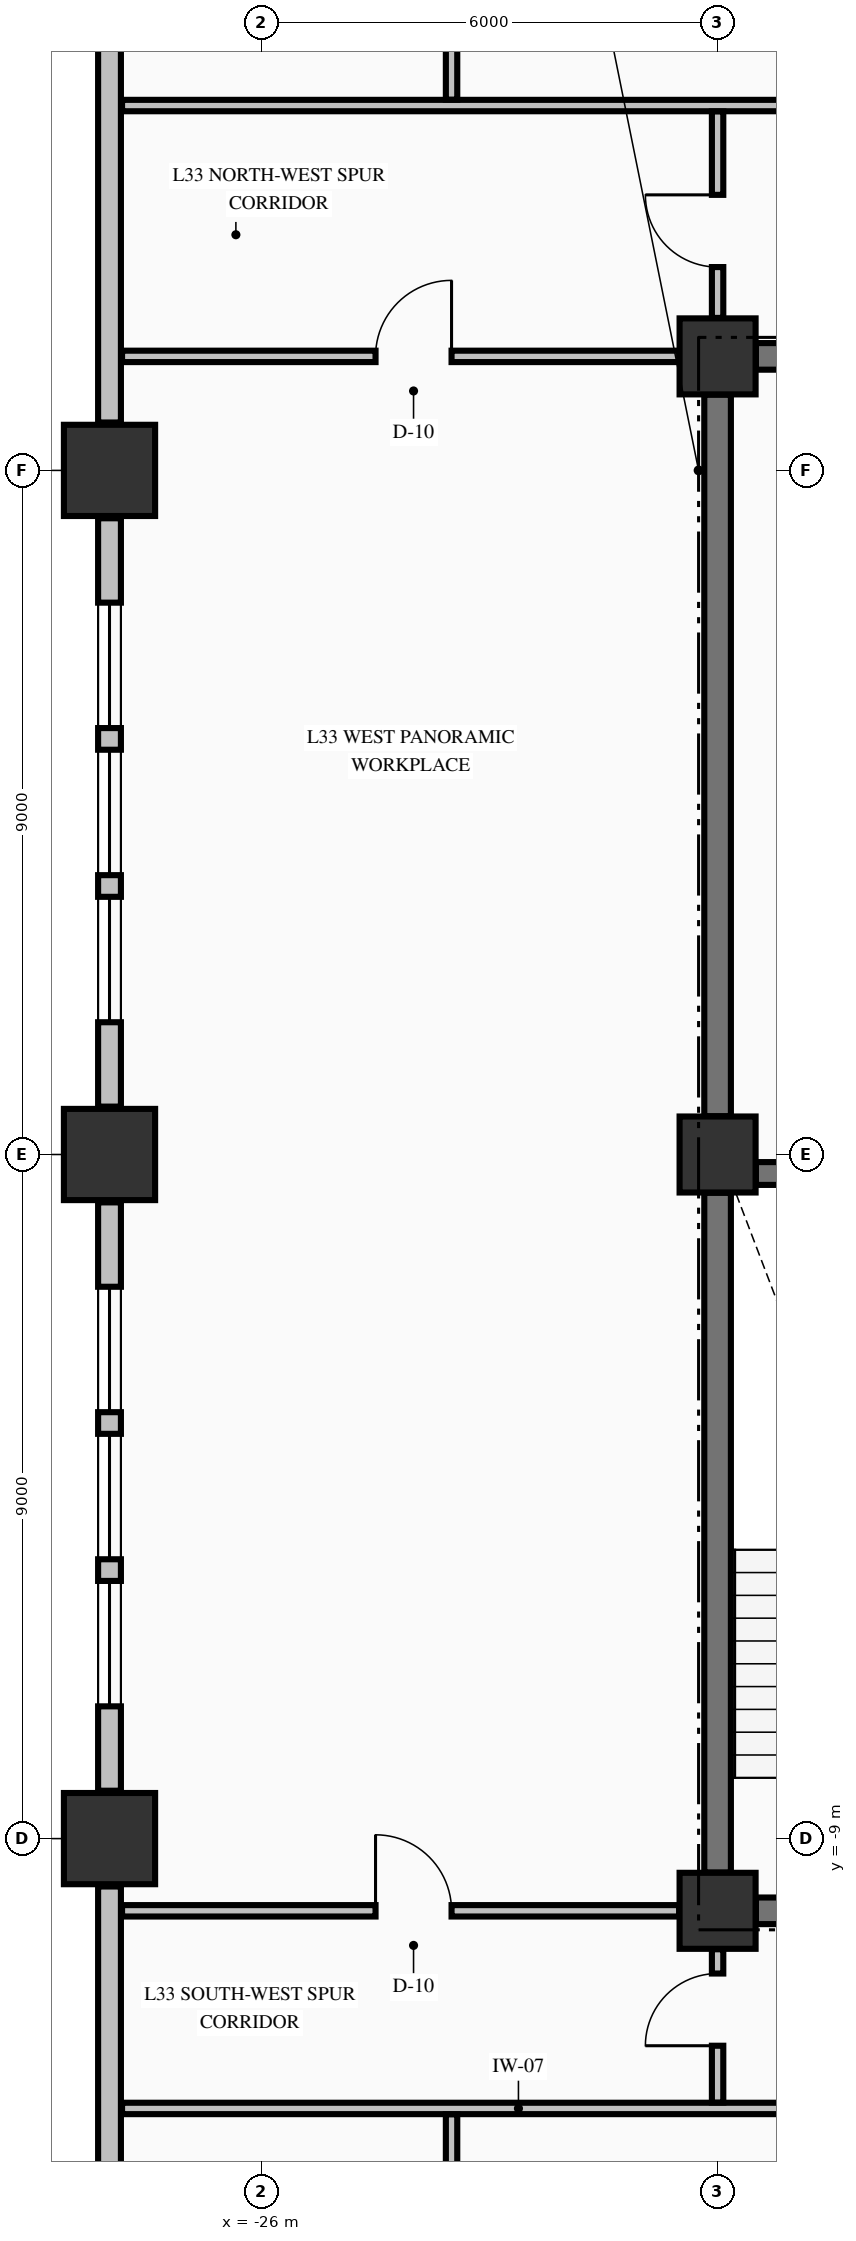
"""IFC4 building model, lengths in metres.
Left out: names, types, materials, properties, quantities, classifications, styles, units other than length and angle.
Written with IfcOpenShell. Run it as: python <this file> out.ifc"""

import sys

from ifc_helpers import new_model, si_unit, direction, frame, frame_2d, origin, origin_2d, place, context, subcontext, project, spatial, rectangle, extrude, element, fill, save


model = new_model("IFC4")
c1 = context("Model", 3, precision=1e-05, world=origin(), true_north=direction((0.0, 1.0)))
c2 = subcontext(c1, "Body", "Model", "MODEL_VIEW")
j1 = project(units=[si_unit("LENGTHUNIT", "METRE"), si_unit("PLANEANGLEUNIT", "RADIAN")], contexts=[c1])
p1 = place(None, origin())
s1 = spatial("IfcSite", under=j1, at=p1, CompositionType="ELEMENT")
p2 = place(p1, origin())
s2 = spatial("IfcBuilding", under=s1, at=p2, CompositionType="ELEMENT")
p3 = place(p2, frame((0.0, 0.0, 132.06)))
s3 = spatial("IfcBuildingStorey", under=s2, at=p3, CompositionType="ELEMENT", Elevation=132.06)
for number, where, z_axis, x_axis in (
    (1, (-28.0, -9.0, -0.25), (0.0, 0.0, 1.0), (1.0, 0.0, 0.0)),
    (2, (-28.0, 0.0, -0.25), (0.0, 0.0, 1.0), (1.0, 0.0, 0.0)),
    (3, (-28.0, 9.0, -0.25), (0.0, 0.0, 1.0), (1.0, 0.0, 0.0)),
):
    element("IfcColumn", number, at=place(p3, frame(where, z_axis=z_axis, x_axis=x_axis)), inside=s3, PredefinedType="COLUMN", context=c2, shape_type="SweptSolid", body=[
        extrude(rectangle(XDim=1.2, YDim=1.2, at=origin_2d()), origin(), (0.0, 0.0, 1.0), 3.57),
    ])
for number, where, z_axis, x_axis in (
    (4, (-20.0, -9.95, -0.25), (0.0, 0.0, 1.0), (1.0, 0.0, 0.0)),
    (5, (-20.0, 10.5, -0.25), (0.0, 0.0, 1.0), (1.0, 0.0, 0.0)),
    (6, (-20.0, 0.0, -0.25), (0.0, 0.0, 1.0), (1.0, 0.0, 0.0)),
):
    element("IfcColumn", number, at=place(p3, frame(where, z_axis=z_axis, x_axis=x_axis)), inside=s3, PredefinedType="COLUMN", context=c2, shape_type="SweptSolid", body=[
        extrude(rectangle(XDim=1.0, YDim=1.0, at=origin_2d()), origin(), (0.0, 0.0, 1.0), 3.57),
    ])
p4 = place(p3, frame((-28.0, -9.63, 0.0), z_axis=(0.0, 0.0, 1.0), x_axis=(0.0, -1.0, 0.0)))
e7 = element("IfcWall", 7, at=p4, inside=s3, PredefinedType="STANDARD", context=c2, shape_type="SweptSolid", body=[
    extrude(rectangle(XDim=10.74, YDim=0.3, at=frame_2d((5.37, 0.0))), origin(), (0.0, 0.0, 1.0), 2.712),
])
p5 = place(p3, frame((-28.0, -0.63, 0.0), z_axis=(0.0, 0.0, 1.0), x_axis=(0.0, -1.0, 0.0)))
e8 = element("IfcWall", 8, at=p5, inside=s3, PredefinedType="STANDARD", context=c2, shape_type="SweptSolid", body=[
    extrude(rectangle(XDim=7.74, YDim=0.3, at=frame_2d((3.87, 0.0))), origin(), (0.0, 0.0, 1.0), 2.712),
])
p6 = place(p5, frame((1.11, 0.0, 0.8)))
e9 = element("IfcOpeningElement", 9, at=p6, cuts=e8, PredefinedType="OPENING", context=c2, shape_type="SweptSolid", body=[
    extrude(rectangle(XDim=1.65, YDim=1.7, at=frame_2d((0.825, 0.85))), frame((0.0, 0.16, 0.0), z_axis=(0.0, -1.0, 0.0), x_axis=(1.0, 0.0, 0.0)), (0.0, 0.0, 1.0), 0.32),
])
p7 = place(p5, frame((3.045, 0.0, 0.8)))
e10 = element("IfcOpeningElement", 10, at=p7, cuts=e8, PredefinedType="OPENING", context=c2, shape_type="SweptSolid", body=[
    extrude(rectangle(XDim=1.65, YDim=1.7, at=frame_2d((0.825, 0.85))), frame((0.0, 0.16, 0.0), z_axis=(0.0, -1.0, 0.0), x_axis=(1.0, 0.0, 0.0)), (0.0, 0.0, 1.0), 0.32),
])
p8 = place(p5, frame((4.98, 0.0, 0.8)))
e11 = element("IfcOpeningElement", 11, at=p8, cuts=e8, PredefinedType="OPENING", context=c2, shape_type="SweptSolid", body=[
    extrude(rectangle(XDim=1.65, YDim=1.7, at=frame_2d((0.825, 0.85))), frame((0.0, 0.16, 0.0), z_axis=(0.0, -1.0, 0.0), x_axis=(1.0, 0.0, 0.0)), (0.0, 0.0, 1.0), 0.32),
])
p9 = place(p3, frame((-28.0, 8.37, 0.0), z_axis=(0.0, 0.0, 1.0), x_axis=(0.0, -1.0, 0.0)))
e12 = element("IfcWall", 12, at=p9, inside=s3, PredefinedType="STANDARD", context=c2, shape_type="SweptSolid", body=[
    extrude(rectangle(XDim=7.74, YDim=0.3, at=frame_2d((3.87, 0.0))), origin(), (0.0, 0.0, 1.0), 2.712),
])
p10 = place(p9, frame((1.11, 0.0, 0.8)))
e13 = element("IfcOpeningElement", 13, at=p10, cuts=e12, PredefinedType="OPENING", context=c2, shape_type="SweptSolid", body=[
    extrude(rectangle(XDim=1.65, YDim=1.7, at=frame_2d((0.825, 0.85))), frame((0.0, 0.16, 0.0), z_axis=(0.0, -1.0, 0.0), x_axis=(1.0, 0.0, 0.0)), (0.0, 0.0, 1.0), 0.32),
])
p11 = place(p9, frame((3.045, 0.0, 0.8)))
e14 = element("IfcOpeningElement", 14, at=p11, cuts=e12, PredefinedType="OPENING", context=c2, shape_type="SweptSolid", body=[
    extrude(rectangle(XDim=1.65, YDim=1.7, at=frame_2d((0.825, 0.85))), frame((0.0, 0.16, 0.0), z_axis=(0.0, -1.0, 0.0), x_axis=(1.0, 0.0, 0.0)), (0.0, 0.0, 1.0), 0.32),
])
p12 = place(p9, frame((4.98, 0.0, 0.8)))
e15 = element("IfcOpeningElement", 15, at=p12, cuts=e12, PredefinedType="OPENING", context=c2, shape_type="SweptSolid", body=[
    extrude(rectangle(XDim=1.65, YDim=1.7, at=frame_2d((0.825, 0.85))), frame((0.0, 0.16, 0.0), z_axis=(0.0, -1.0, 0.0), x_axis=(1.0, 0.0, 0.0)), (0.0, 0.0, 1.0), 0.32),
])
p13 = place(p3, frame((-28.0, 20.37, 0.0), z_axis=(0.0, 0.0, 1.0), x_axis=(0.0, -1.0, 0.0)))
e16 = element("IfcWall", 16, at=p13, inside=s3, PredefinedType="STANDARD", context=c2, shape_type="SweptSolid", body=[
    extrude(rectangle(XDim=10.74, YDim=0.3, at=frame_2d((5.37, 0.0))), origin(), (0.0, 0.0, 1.0), 2.712),
])
p14 = place(p3, frame((-19.496, -9.95, 0.0), z_axis=(0.0, 0.0, 1.0), x_axis=(1.0, 0.0, 0.0)))
e17 = element("IfcWall", 17, at=p14, inside=s3, PredefinedType="SHEAR", context=c2, shape_type="SweptSolid", body=[
    extrude(rectangle(XDim=4.796, YDim=0.35, at=frame_2d((2.398, 0.0))), origin(), (0.0, 0.0, 1.0), 3.32),
])
p15 = place(p14, frame((0.671, 0.0, 0.0)))
e18 = element("IfcOpeningElement", 18, at=p15, cuts=e17, PredefinedType="OPENING", context=c2, shape_type="SweptSolid", body=[
    extrude(rectangle(XDim=1.05, YDim=2.15, at=frame_2d((0.525, 1.075))), frame((0.0, 0.185, 0.0), z_axis=(0.0, -1.0, 0.0), x_axis=(1.0, 0.0, 0.0)), (0.0, 0.0, 1.0), 0.37),
])
p16 = place(p3, frame((-19.496, -0.25, 0.0), z_axis=(0.0, 0.0, 1.0), x_axis=(1.0, 0.0, 0.0)))
e19 = element("IfcWall", 19, at=p16, inside=s3, PredefinedType="SHEAR", context=c2, shape_type="SweptSolid", body=[
    extrude(rectangle(XDim=7.992, YDim=0.3, at=frame_2d((3.996, 0.0))), origin(), (0.0, 0.0, 1.0), 3.32),
])
p17 = place(p16, frame((5.796, 0.0, 0.0)))
e20 = element("IfcOpeningElement", 20, at=p17, cuts=e19, PredefinedType="OPENING", context=c2, shape_type="SweptSolid", body=[
    extrude(rectangle(XDim=1.1, YDim=2.15, at=frame_2d((0.55, 1.075))), frame((0.0, 0.16, 0.0), z_axis=(0.0, -1.0, 0.0), x_axis=(1.0, 0.0, 0.0)), (0.0, 0.0, 1.0), 0.32),
])
p18 = place(p3, frame((-19.496, 10.5, 0.0), z_axis=(0.0, 0.0, 1.0), x_axis=(1.0, 0.0, 0.0)))
e21 = element("IfcWall", 21, at=p18, inside=s3, PredefinedType="SHEAR", context=c2, shape_type="SweptSolid", body=[
    extrude(rectangle(XDim=4.796, YDim=0.35, at=frame_2d((2.398, 0.0))), origin(), (0.0, 0.0, 1.0), 3.32),
])
p19 = place(p18, frame((0.646, 0.0, 0.0)))
e22 = element("IfcOpeningElement", 22, at=p19, cuts=e21, PredefinedType="OPENING", context=c2, shape_type="SweptSolid", body=[
    extrude(rectangle(XDim=0.9, YDim=2.15, at=frame_2d((0.45, 1.075))), frame((0.0, 0.185, 0.0), z_axis=(0.0, -1.0, 0.0), x_axis=(1.0, 0.0, 0.0)), (0.0, 0.0, 1.0), 0.37),
])
p20 = place(p18, frame((3.271, 0.0, 0.0)))
e23 = element("IfcOpeningElement", 23, at=p20, cuts=e21, PredefinedType="OPENING", context=c2, shape_type="SweptSolid", body=[
    extrude(rectangle(XDim=0.95, YDim=2.15, at=frame_2d((0.475, 1.075))), frame((0.0, 0.185, 0.0), z_axis=(0.0, -1.0, 0.0), x_axis=(1.0, 0.0, 0.0)), (0.0, 0.0, 1.0), 0.37),
])
p21 = place(p3, frame((-27.835, -12.55, 0.0), z_axis=(0.0, 0.0, 1.0), x_axis=(1.0, 0.0, 0.0)))
e24 = element("IfcWall", 24, at=p21, inside=s3, PredefinedType="PARTITIONING", context=c2, shape_type="SweptSolid", body=[
    extrude(rectangle(XDim=50.67, YDim=0.15, at=frame_2d((25.335, 0.0))), origin(), (0.0, 0.0, 1.0), 3.32),
])
p22 = place(p21, frame((10.43, 0.0, 0.0)))
e25 = element("IfcOpeningElement", 25, at=p22, cuts=e24, PredefinedType="OPENING", context=c2, shape_type="SweptSolid", body=[
    extrude(rectangle(XDim=1.05, YDim=2.15, at=frame_2d((0.525, 1.075))), frame((0.0, 0.085, 0.0), z_axis=(0.0, -1.0, 0.0), x_axis=(1.0, 0.0, 0.0)), (0.0, 0.0, 1.0), 0.17),
])
p23 = place(p21, frame((15.06, 0.0, 0.0)))
e26 = element("IfcOpeningElement", 26, at=p23, cuts=e24, PredefinedType="OPENING", context=c2, shape_type="SweptSolid", body=[
    extrude(rectangle(XDim=0.95, YDim=2.15, at=frame_2d((0.475, 1.075))), frame((0.0, 0.085, 0.0), z_axis=(0.0, -1.0, 0.0), x_axis=(1.0, 0.0, 0.0)), (0.0, 0.0, 1.0), 0.17),
])
p24 = place(p21, frame((24.96, 0.0, 0.0)))
e27 = element("IfcOpeningElement", 27, at=p24, cuts=e24, PredefinedType="OPENING", context=c2, shape_type="SweptSolid", body=[
    extrude(rectangle(XDim=1.05, YDim=2.15, at=frame_2d((0.525, 1.075))), frame((0.0, 0.085, 0.0), z_axis=(0.0, -1.0, 0.0), x_axis=(1.0, 0.0, 0.0)), (0.0, 0.0, 1.0), 0.17),
])
p25 = place(p21, frame((33.01, 0.0, 0.0)))
e28 = element("IfcOpeningElement", 28, at=p25, cuts=e24, PredefinedType="OPENING", context=c2, shape_type="SweptSolid", body=[
    extrude(rectangle(XDim=0.95, YDim=2.15, at=frame_2d((0.475, 1.075))), frame((0.0, 0.085, 0.0), z_axis=(0.0, -1.0, 0.0), x_axis=(1.0, 0.0, 0.0)), (0.0, 0.0, 1.0), 0.17),
])
p26 = place(p21, frame((41.09, 0.0, 0.0)))
e29 = element("IfcOpeningElement", 29, at=p26, cuts=e24, PredefinedType="OPENING", context=c2, shape_type="SweptSolid", body=[
    extrude(rectangle(XDim=1.05, YDim=2.15, at=frame_2d((0.525, 1.075))), frame((0.0, 0.085, 0.0), z_axis=(0.0, -1.0, 0.0), x_axis=(1.0, 0.0, 0.0)), (0.0, 0.0, 1.0), 0.17),
])
p27 = place(p3, frame((-27.835, -9.95, 0.0), z_axis=(0.0, 0.0, 1.0), x_axis=(1.0, 0.0, 0.0)))
e30 = element("IfcWall", 30, at=p27, inside=s3, PredefinedType="PARTITIONING", context=c2, shape_type="SweptSolid", body=[
    extrude(rectangle(XDim=7.329, YDim=0.15, at=frame_2d((3.665, 0.0))), origin(), (0.0, 0.0, 1.0), 3.32),
])
p28 = place(p27, frame((3.335, 0.0, 0.0)))
e31 = element("IfcOpeningElement", 31, at=p28, cuts=e30, PredefinedType="OPENING", context=c2, shape_type="SweptSolid", body=[
    extrude(rectangle(XDim=1.0, YDim=2.15, at=frame_2d((0.5, 1.075))), frame((0.0, 0.085, 0.0), z_axis=(0.0, -1.0, 0.0), x_axis=(1.0, 0.0, 0.0)), (0.0, 0.0, 1.0), 0.17),
])
p29 = place(p3, frame((-27.835, 10.5, 0.0), z_axis=(0.0, 0.0, 1.0), x_axis=(1.0, 0.0, 0.0)))
e32 = element("IfcWall", 32, at=p29, inside=s3, PredefinedType="PARTITIONING", context=c2, shape_type="SweptSolid", body=[
    extrude(rectangle(XDim=7.329, YDim=0.15, at=frame_2d((3.665, 0.0))), origin(), (0.0, 0.0, 1.0), 3.32),
])
p30 = place(p29, frame((3.335, 0.0, 0.0)))
e33 = element("IfcOpeningElement", 33, at=p30, cuts=e32, PredefinedType="OPENING", context=c2, shape_type="SweptSolid", body=[
    extrude(rectangle(XDim=1.0, YDim=2.15, at=frame_2d((0.5, 1.075))), frame((0.0, 0.085, 0.0), z_axis=(0.0, -1.0, 0.0), x_axis=(1.0, 0.0, 0.0)), (0.0, 0.0, 1.0), 0.17),
])
p31 = place(p3, frame((-27.835, 13.8, 0.0), z_axis=(0.0, 0.0, 1.0), x_axis=(1.0, 0.0, 0.0)))
e34 = element("IfcWall", 34, at=p31, inside=s3, PredefinedType="PARTITIONING", context=c2, shape_type="SweptSolid", body=[
    extrude(rectangle(XDim=50.67, YDim=0.15, at=frame_2d((25.335, 0.0))), origin(), (0.0, 0.0, 1.0), 3.32),
])
p32 = place(p31, frame((13.31, 0.0, 0.0)))
e35 = element("IfcOpeningElement", 35, at=p32, cuts=e34, PredefinedType="OPENING", context=c2, shape_type="SweptSolid", body=[
    extrude(rectangle(XDim=1.05, YDim=2.15, at=frame_2d((0.525, 1.075))), frame((0.0, 0.085, 0.0), z_axis=(0.0, -1.0, 0.0), x_axis=(1.0, 0.0, 0.0)), (0.0, 0.0, 1.0), 0.17),
])
p33 = place(p31, frame((25.61, 0.0, 0.0)))
e36 = element("IfcOpeningElement", 36, at=p33, cuts=e34, PredefinedType="OPENING", context=c2, shape_type="SweptSolid", body=[
    extrude(rectangle(XDim=1.05, YDim=2.15, at=frame_2d((0.525, 1.075))), frame((0.0, 0.085, 0.0), z_axis=(0.0, -1.0, 0.0), x_axis=(1.0, 0.0, 0.0)), (0.0, 0.0, 1.0), 0.17),
])
p34 = place(p31, frame((33.76, 0.0, 0.0)))
e37 = element("IfcOpeningElement", 37, at=p34, cuts=e34, PredefinedType="OPENING", context=c2, shape_type="SweptSolid", body=[
    extrude(rectangle(XDim=1.05, YDim=2.15, at=frame_2d((0.525, 1.075))), frame((0.0, 0.085, 0.0), z_axis=(0.0, -1.0, 0.0), x_axis=(1.0, 0.0, 0.0)), (0.0, 0.0, 1.0), 0.17),
])
p35 = place(p3, frame((-20.0, -9.446, 0.0), z_axis=(0.0, 0.0, 1.0), x_axis=(0.0, 1.0, 0.0)))
e38 = element("IfcWall", 38, at=p35, inside=s3, PredefinedType="SHEAR", context=c2, shape_type="SweptSolid", body=[
    extrude(rectangle(XDim=8.942, YDim=0.35, at=frame_2d((4.471, 0.0))), origin(), (0.0, 0.0, 1.0), 3.32),
])
p36 = place(p3, frame((-20.0, 0.504, 0.0), z_axis=(0.0, 0.0, 1.0), x_axis=(0.0, 1.0, 0.0)))
e39 = element("IfcWall", 39, at=p36, inside=s3, PredefinedType="SHEAR", context=c2, shape_type="SweptSolid", body=[
    extrude(rectangle(XDim=9.492, YDim=0.35, at=frame_2d((4.746, 0.0))), origin(), (0.0, 0.0, 1.0), 3.32),
])
p37 = place(p3, frame((-23.5, -20.394, 0.0), z_axis=(0.0, 0.0, 1.0), x_axis=(0.0, 1.0, 0.0)))
e40 = element("IfcWall", 40, at=p37, inside=s3, PredefinedType="PARTITIONING", context=c2, shape_type="SweptSolid", body=[
    extrude(rectangle(XDim=7.766, YDim=0.15, at=frame_2d((3.883, 0.0))), origin(), (0.0, 0.0, 1.0), 3.32),
])
p38 = place(p3, frame((-23.5, 13.878, 0.0), z_axis=(0.0, 0.0, 1.0), x_axis=(0.0, 1.0, 0.0)))
e41 = element("IfcWall", 41, at=p38, inside=s3, PredefinedType="PARTITIONING", context=c2, shape_type="SweptSolid", body=[
    extrude(rectangle(XDim=6.516, YDim=0.15, at=frame_2d((3.258, 0.0))), origin(), (0.0, 0.0, 1.0), 3.32),
])
p39 = place(p3, frame((-20.0, -12.472, 0.0), z_axis=(0.0, 0.0, 1.0), x_axis=(0.0, 1.0, 0.0)))
e42 = element("IfcWall", 42, at=p39, inside=s3, PredefinedType="PARTITIONING", context=c2, shape_type="SweptSolid", body=[
    extrude(rectangle(XDim=2.016, YDim=0.15, at=frame_2d((1.008, 0.0))), origin(), (0.0, 0.0, 1.0), 2.81),
])
p40 = place(p39, frame((0.747, 0.0, 0.0)))
e43 = element("IfcOpeningElement", 43, at=p40, cuts=e42, PredefinedType="OPENING", context=c2, shape_type="SweptSolid", body=[
    extrude(rectangle(XDim=0.95, YDim=2.15, at=frame_2d((0.475, 1.075))), frame((0.0, 0.085, 0.0), z_axis=(0.0, -1.0, 0.0), x_axis=(1.0, 0.0, 0.0)), (0.0, 0.0, 1.0), 0.17),
])
p41 = place(p3, frame((-20.0, 11.006, 0.0), z_axis=(0.0, 0.0, 1.0), x_axis=(0.0, 1.0, 0.0)))
e44 = element("IfcWall", 44, at=p41, inside=s3, PredefinedType="PARTITIONING", context=c2, shape_type="SweptSolid", body=[
    extrude(rectangle(XDim=2.716, YDim=0.15, at=frame_2d((1.358, 0.0))), origin(), (0.0, 0.0, 1.0), 2.81),
])
p42 = place(p41, frame((0.669, 0.0, 0.0)))
e45 = element("IfcOpeningElement", 45, at=p42, cuts=e44, PredefinedType="OPENING", context=c2, shape_type="SweptSolid", body=[
    extrude(rectangle(XDim=0.95, YDim=2.15, at=frame_2d((0.475, 1.075))), frame((0.0, 0.085, 0.0), z_axis=(0.0, -1.0, 0.0), x_axis=(1.0, 0.0, 0.0)), (0.0, 0.0, 1.0), 0.17),
])
p43 = place(p6, origin())
e46 = element("IfcWindow", 46, at=p43, inside=s3, PartitioningType="SINGLE_PANEL", PredefinedType="WINDOW", context=c2, shape_type="SweptSolid", body=[
    extrude(rectangle(XDim=1.65, YDim=1.7, at=frame_2d((0.825, 0.85))), frame((0.0, 0.03, 0.0), z_axis=(0.0, -1.0, 0.0), x_axis=(1.0, 0.0, 0.0)), (0.0, 0.0, 1.0), 0.06),
])
fill(e9, e46)
p44 = place(p7, origin())
e47 = element("IfcWindow", 47, at=p44, inside=s3, PartitioningType="SINGLE_PANEL", PredefinedType="WINDOW", context=c2, shape_type="SweptSolid", body=[
    extrude(rectangle(XDim=1.65, YDim=1.7, at=frame_2d((0.825, 0.85))), frame((0.0, 0.03, 0.0), z_axis=(0.0, -1.0, 0.0), x_axis=(1.0, 0.0, 0.0)), (0.0, 0.0, 1.0), 0.06),
])
fill(e10, e47)
p45 = place(p8, origin())
e48 = element("IfcWindow", 48, at=p45, inside=s3, PartitioningType="SINGLE_PANEL", PredefinedType="WINDOW", context=c2, shape_type="SweptSolid", body=[
    extrude(rectangle(XDim=1.65, YDim=1.7, at=frame_2d((0.825, 0.85))), frame((0.0, 0.03, 0.0), z_axis=(0.0, -1.0, 0.0), x_axis=(1.0, 0.0, 0.0)), (0.0, 0.0, 1.0), 0.06),
])
fill(e11, e48)
p46 = place(p10, origin())
e49 = element("IfcWindow", 49, at=p46, inside=s3, PartitioningType="SINGLE_PANEL", PredefinedType="WINDOW", context=c2, shape_type="SweptSolid", body=[
    extrude(rectangle(XDim=1.65, YDim=1.7, at=frame_2d((0.825, 0.85))), frame((0.0, 0.03, 0.0), z_axis=(0.0, -1.0, 0.0), x_axis=(1.0, 0.0, 0.0)), (0.0, 0.0, 1.0), 0.06),
])
fill(e13, e49)
p47 = place(p11, origin())
e50 = element("IfcWindow", 50, at=p47, inside=s3, PartitioningType="SINGLE_PANEL", PredefinedType="WINDOW", context=c2, shape_type="SweptSolid", body=[
    extrude(rectangle(XDim=1.65, YDim=1.7, at=frame_2d((0.825, 0.85))), frame((0.0, 0.03, 0.0), z_axis=(0.0, -1.0, 0.0), x_axis=(1.0, 0.0, 0.0)), (0.0, 0.0, 1.0), 0.06),
])
fill(e14, e50)
p48 = place(p12, origin())
e51 = element("IfcWindow", 51, at=p48, inside=s3, PartitioningType="SINGLE_PANEL", PredefinedType="WINDOW", context=c2, shape_type="SweptSolid", body=[
    extrude(rectangle(XDim=1.65, YDim=1.7, at=frame_2d((0.825, 0.85))), frame((0.0, 0.03, 0.0), z_axis=(0.0, -1.0, 0.0), x_axis=(1.0, 0.0, 0.0)), (0.0, 0.0, 1.0), 0.06),
])
fill(e15, e51)
p49 = place(p42, origin())
e52 = element("IfcDoor", 52, at=p49, inside=s3, OperationType="SINGLE_SWING_RIGHT", PredefinedType="DOOR", context=c2, shape_type="SweptSolid", body=[
    extrude(rectangle(XDim=0.95, YDim=2.15, at=frame_2d((0.475, 1.075))), frame((0.0, 0.025, 0.0), z_axis=(0.0, -1.0, 0.0), x_axis=(1.0, 0.0, 0.0)), (0.0, 0.0, 1.0), 0.05),
])
fill(e45, e52)
p50 = place(p40, origin())
e53 = element("IfcDoor", 53, at=p50, inside=s3, OperationType="SINGLE_SWING_LEFT", PredefinedType="DOOR", context=c2, shape_type="SweptSolid", body=[
    extrude(rectangle(XDim=0.95, YDim=2.15, at=frame_2d((0.475, 1.075))), frame((0.0, 0.025, 0.0), z_axis=(0.0, -1.0, 0.0), x_axis=(1.0, 0.0, 0.0)), (0.0, 0.0, 1.0), 0.05),
])
fill(e43, e53)
p51 = place(p30, origin())
e54 = element("IfcDoor", 54, at=p51, inside=s3, OperationType="SINGLE_SWING_RIGHT", PredefinedType="DOOR", context=c2, shape_type="SweptSolid", body=[
    extrude(rectangle(XDim=1.0, YDim=2.15, at=frame_2d((0.5, 1.075))), frame((0.0, 0.025, 0.0), z_axis=(0.0, -1.0, 0.0), x_axis=(1.0, 0.0, 0.0)), (0.0, 0.0, 1.0), 0.05),
])
fill(e33, e54)
p52 = place(p28, origin())
e55 = element("IfcDoor", 55, at=p52, inside=s3, OperationType="SINGLE_SWING_LEFT", PredefinedType="DOOR", context=c2, shape_type="SweptSolid", body=[
    extrude(rectangle(XDim=1.0, YDim=2.15, at=frame_2d((0.5, 1.075))), frame((0.0, 0.025, 0.0), z_axis=(0.0, -1.0, 0.0), x_axis=(1.0, 0.0, 0.0)), (0.0, 0.0, 1.0), 0.05),
])
fill(e31, e55)
save(model, sys.argv[1])
